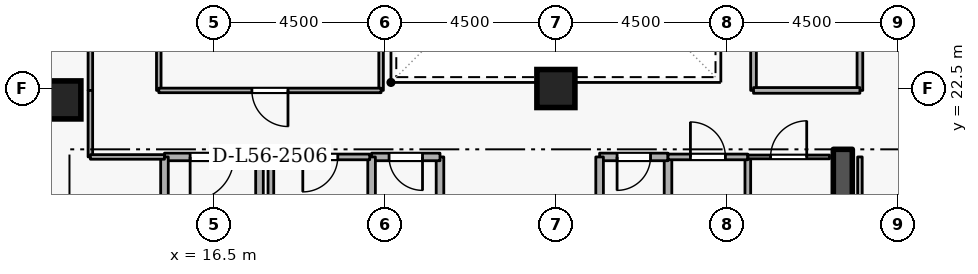
"""IFC4 building model, lengths in metres.
Left out: names, types, materials, properties, quantities, classifications, styles, units other than length and angle.
Written with IfcOpenShell. Run it as: python <this file> out.ifc"""

import sys

from ifc_helpers import new_model, si_unit, direction, frame, frame_2d, origin, origin_2d, place, context, subcontext, project, spatial, rectangle, extrude, element, fill, save


model = new_model("IFC4")
c1 = context("Model", 3, precision=1e-05, world=origin(), true_north=direction((0.0, 1.0)))
c2 = subcontext(c1, "Body", "Model", "MODEL_VIEW")
j1 = project(units=[si_unit("LENGTHUNIT", "METRE"), si_unit("PLANEANGLEUNIT", "RADIAN")], contexts=[c1])
p1 = place(None, origin())
s1 = spatial("IfcSite", under=j1, at=p1, CompositionType="ELEMENT")
p2 = place(p1, origin())
s2 = spatial("IfcBuilding", under=s1, at=p2, CompositionType="ELEMENT")
p3 = place(p2, frame((0.0, 0.0, 210.9)))
s3 = spatial("IfcBuildingStorey", under=s2, at=p3, CompositionType="ELEMENT", Elevation=210.9)
p4 = place(p3, frame((33.05, 15.1, 0.0), z_axis=(0.0, 0.0, 1.0), x_axis=(0.0, 1.0, 0.0)))
e1 = element("IfcWall", 1, at=p4, inside=s3, PredefinedType="SHEAR", context=c2, shape_type="SweptSolid", body=[
    extrude(rectangle(XDim=5.8, YDim=0.5, at=frame_2d((2.9, 0.0))), origin(), (0.0, 0.0, 1.0), 3.6),
])
for number, where, z_axis, x_axis in (
    (2, (12.5, 22.2, 0.0), (0.0, 0.0, 1.0), (1.0, 0.0, 0.0)),
    (3, (25.5, 22.5, 0.0), (0.0, 0.0, 1.0), (1.0, 0.0, 0.0)),
):
    element("IfcColumn", number, at=place(p3, frame(where, z_axis=z_axis, x_axis=x_axis)), inside=s3, PredefinedType="COLUMN", context=c2, shape_type="SweptSolid", body=[
        extrude(rectangle(XDim=1.0, YDim=1.0, at=origin_2d()), origin(), (0.0, 0.0, 1.0), 3.6),
    ])
p5 = place(p3, frame((17.7, 18.4, 0.0), z_axis=(0.0, 0.0, 1.0), x_axis=(0.0, 1.0, 0.0)))
e4 = element("IfcWall", 4, at=p5, inside=s3, PredefinedType="STANDARD", context=c2, shape_type="SweptSolid", body=[
    extrude(rectangle(XDim=2.3, YDim=0.2, at=frame_2d((1.15, 0.0))), origin(), (0.0, 0.0, 1.0), 2.545),
])
p6 = place(p3, frame((17.7, 20.7, 0.0), z_axis=(0.0, 0.0, 1.0), x_axis=(-1.0, 0.0, 0.0)))
e5 = element("IfcWall", 5, at=p6, inside=s3, PredefinedType="STANDARD", context=c2, shape_type="SweptSolid", body=[
    extrude(rectangle(XDim=2.5, YDim=0.2, at=frame_2d((1.25, 0.0))), origin(), (0.0, 0.0, 1.0), 3.34),
])
p7 = place(p6, frame((0.675, 0.0, 0.0)))
e6 = element("IfcOpeningElement", 6, at=p7, cuts=e5, PredefinedType="OPENING", context=c2, shape_type="SweptSolid", body=[
    extrude(rectangle(XDim=1.15, YDim=2.1, at=frame_2d((0.575, 1.05))), frame((0.0, 0.11, 0.0), z_axis=(0.0, -1.0, 0.0), x_axis=(1.0, 0.0, 0.0)), (0.0, 0.0, 1.0), 0.22),
])
p8 = place(p3, frame((15.2, 20.7, 0.0), z_axis=(0.0, 0.0, 1.0), x_axis=(0.0, -1.0, 0.0)))
e7 = element("IfcWall", 7, at=p8, inside=s3, PredefinedType="STANDARD", context=c2, shape_type="SweptSolid", body=[
    extrude(rectangle(XDim=5.7, YDim=0.2, at=frame_2d((2.85, 0.0))), origin(), (0.0, 0.0, 1.0), 3.34),
])
p9 = place(p3, frame((28.45, 18.65, 0.0), z_axis=(0.0, 0.0, 1.0), x_axis=(0.0, 1.0, 0.0)))
e8 = element("IfcWall", 8, at=p9, inside=s3, PredefinedType="STANDARD", context=c2, shape_type="SweptSolid", body=[
    extrude(rectangle(XDim=2.05, YDim=0.2, at=frame_2d((1.025, 0.0))), origin(), (0.0, 0.0, 1.0), 3.34),
])
p10 = place(p3, frame((28.45, 20.7, 0.0), z_axis=(0.0, 0.0, 1.0), x_axis=(-1.0, 0.0, 0.0)))
e9 = element("IfcWall", 9, at=p10, inside=s3, PredefinedType="STANDARD", context=c2, shape_type="SweptSolid", body=[
    extrude(rectangle(XDim=1.8, YDim=0.2, at=frame_2d((0.9, 0.0))), origin(), (0.0, 0.0, 1.0), 3.34),
])
p11 = place(p10, frame((0.46, 0.0, 0.0)))
e10 = element("IfcOpeningElement", 10, at=p11, cuts=e9, PredefinedType="OPENING", context=c2, shape_type="SweptSolid", body=[
    extrude(rectangle(XDim=0.88, YDim=2.04, at=frame_2d((0.44, 1.02))), frame((0.0, 0.11, 0.0), z_axis=(0.0, -1.0, 0.0), x_axis=(1.0, 0.0, 0.0)), (0.0, 0.0, 1.0), 0.22),
])
for number, where, z_axis, x_axis in (
    (11, (26.65, 20.7, 0.0), (0.0, 0.0, 1.0), (0.0, -1.0, 0.0)),
    (12, (22.45, 18.65, 0.0), (0.0, 0.0, 1.0), (0.0, 1.0, 0.0)),
):
    element("IfcWall", number, at=place(p3, frame(where, z_axis=z_axis, x_axis=x_axis)), inside=s3, PredefinedType="STANDARD", context=c2, shape_type="SweptSolid", body=[
        extrude(rectangle(XDim=2.05, YDim=0.2, at=frame_2d((1.025, 0.0))), origin(), (0.0, 0.0, 1.0), 3.34),
    ])
p12 = place(p3, frame((22.45, 20.7, 0.0), z_axis=(0.0, 0.0, 1.0), x_axis=(-1.0, 0.0, 0.0)))
e13 = element("IfcWall", 13, at=p12, inside=s3, PredefinedType="STANDARD", context=c2, shape_type="SweptSolid", body=[
    extrude(rectangle(XDim=1.8, YDim=0.2, at=frame_2d((0.9, 0.0))), origin(), (0.0, 0.0, 1.0), 3.34),
])
p13 = place(p12, frame((0.46, 0.0, 0.0)))
e14 = element("IfcOpeningElement", 14, at=p13, cuts=e13, PredefinedType="OPENING", context=c2, shape_type="SweptSolid", body=[
    extrude(rectangle(XDim=0.88, YDim=2.04, at=frame_2d((0.44, 1.02))), frame((0.0, 0.11, 0.0), z_axis=(0.0, -1.0, 0.0), x_axis=(1.0, 0.0, 0.0)), (0.0, 0.0, 1.0), 0.22),
])
p14 = place(p3, frame((20.65, 20.7, 0.0), z_axis=(0.0, 0.0, 1.0), x_axis=(0.0, -1.0, 0.0)))
e15 = element("IfcWall", 15, at=p14, inside=s3, PredefinedType="STANDARD", context=c2, shape_type="SweptSolid", body=[
    extrude(rectangle(XDim=2.05, YDim=0.2, at=frame_2d((1.025, 0.0))), origin(), (0.0, 0.0, 1.0), 3.34),
])
p15 = place(p3, frame((20.6, 20.7, 0.0), z_axis=(0.0, 0.0, 1.0), x_axis=(-1.0, 0.0, 0.0)))
e16 = element("IfcWall", 16, at=p15, inside=s3, PredefinedType="PARTITIONING", context=c2, shape_type="SweptSolid", body=[
    extrude(rectangle(XDim=2.6, YDim=0.15, at=frame_2d((1.3, 0.0))), origin(), (0.0, 0.0, 1.0), 3.34),
])
p16 = place(p15, frame((0.84, 0.0, 0.0)))
e17 = element("IfcOpeningElement", 17, at=p16, cuts=e16, PredefinedType="OPENING", context=c2, shape_type="SweptSolid", body=[
    extrude(rectangle(XDim=0.92, YDim=2.08, at=frame_2d((0.46, 1.04))), frame((0.0, 0.085, 0.0), z_axis=(0.0, -1.0, 0.0), x_axis=(1.0, 0.0, 0.0)), (0.0, 0.0, 1.0), 0.17),
])
p17 = place(p3, frame((18.0, 20.7, 0.0), z_axis=(0.0, 0.0, 1.0), x_axis=(0.0, -1.0, 0.0)))
e18 = element("IfcWall", 18, at=p17, inside=s3, PredefinedType="PARTITIONING", context=c2, shape_type="SweptSolid", body=[
    extrude(rectangle(XDim=2.05, YDim=0.15, at=frame_2d((1.025, 0.0))), origin(), (0.0, 0.0, 1.0), 2.545),
])
p18 = place(p3, frame((30.55, 20.7, 0.0), z_axis=(0.0, 0.0, 1.0), x_axis=(0.0, -1.0, 0.0)))
e19 = element("IfcWall", 19, at=p18, inside=s3, PredefinedType="PARTITIONING", context=c2, shape_type="SweptSolid", body=[
    extrude(rectangle(XDim=2.05, YDim=0.15, at=frame_2d((1.025, 0.0))), origin(), (0.0, 0.0, 1.0), 3.34),
])
p19 = place(p3, frame((28.45, 20.7, 0.0), z_axis=(0.0, 0.0, 1.0), x_axis=(1.0, 0.0, 0.0)))
e20 = element("IfcWall", 20, at=p19, inside=s3, PredefinedType="PARTITIONING", context=c2, shape_type="SweptSolid", body=[
    extrude(rectangle(XDim=2.1, YDim=0.15, at=frame_2d((1.05, 0.0))), origin(), (0.0, 0.0, 1.0), 3.34),
])
p20 = place(p19, frame((0.59, 0.0, 0.0)))
e21 = element("IfcOpeningElement", 21, at=p20, cuts=e20, PredefinedType="OPENING", context=c2, shape_type="SweptSolid", body=[
    extrude(rectangle(XDim=0.92, YDim=2.08, at=frame_2d((0.46, 1.04))), frame((0.0, 0.085, 0.0), z_axis=(0.0, -1.0, 0.0), x_axis=(1.0, 0.0, 0.0)), (0.0, 0.0, 1.0), 0.17),
])
p21 = place(p3, frame((30.55, 20.7, 0.0), z_axis=(0.0, 0.0, 1.0), x_axis=(1.0, 0.0, 0.0)))
e22 = element("IfcWall", 22, at=p21, inside=s3, PredefinedType="PARTITIONING", context=c2, shape_type="SweptSolid", body=[
    extrude(rectangle(XDim=2.15, YDim=0.1, at=frame_2d((1.075, 0.0))), origin(), (0.0, 0.0, 1.0), 3.34),
])
p22 = place(p21, frame((0.6, 0.0, 0.0)))
e23 = element("IfcOpeningElement", 23, at=p22, cuts=e22, PredefinedType="OPENING", context=c2, shape_type="SweptSolid", body=[
    extrude(rectangle(XDim=0.95, YDim=2.1, at=frame_2d((0.475, 1.05))), frame((0.0, 0.06, 0.0), z_axis=(0.0, -1.0, 0.0), x_axis=(1.0, 0.0, 0.0)), (0.0, 0.0, 1.0), 0.12),
])
p23 = place(p3, frame((33.5, 20.7, 0.0), z_axis=(0.0, 0.0, 1.0), x_axis=(0.0, -1.0, 0.0)))
e24 = element("IfcWall", 24, at=p23, inside=s3, PredefinedType="PARTITIONING", context=c2, shape_type="SweptSolid", body=[
    extrude(rectangle(XDim=5.9, YDim=0.12, at=frame_2d((2.95, 0.0))), origin(), (0.0, 0.0, 1.0), 3.34),
])
p24 = place(p3, frame((13.25, 28.2, 0.0), z_axis=(0.0, 0.0, 1.0), x_axis=(0.0, -1.0, 0.0)))
e25 = element("IfcWall", 25, at=p24, inside=s3, PredefinedType="PARTITIONING", context=c2, shape_type="SweptSolid", body=[
    extrude(rectangle(XDim=5.75, YDim=0.12, at=frame_2d((2.875, 0.0))), origin(), (0.0, 0.0, 1.0), 3.34),
])
p25 = place(p24, frame((2.35, 0.0, 0.0)))
e26 = element("IfcOpeningElement", 26, at=p25, cuts=e25, PredefinedType="OPENING", context=c2, shape_type="SweptSolid", body=[
    extrude(rectangle(XDim=1.05, YDim=2.1, at=frame_2d((0.525, 1.05))), frame((0.0, 0.07, 0.0), z_axis=(0.0, -1.0, 0.0), x_axis=(1.0, 0.0, 0.0)), (0.0, 0.0, 1.0), 0.14),
])
p26 = place(p3, frame((13.25, 22.45, 0.0), z_axis=(0.0, 0.0, 1.0), x_axis=(0.0, -1.0, 0.0)))
e27 = element("IfcWall", 27, at=p26, inside=s3, PredefinedType="PARTITIONING", context=c2, shape_type="SweptSolid", body=[
    extrude(rectangle(XDim=1.75, YDim=0.12, at=frame_2d((0.875, 0.0))), origin(), (0.0, 0.0, 1.0), 3.34),
])
p27 = place(p3, frame((13.25, 20.7, 0.0), z_axis=(0.0, 0.0, 1.0), x_axis=(1.0, 0.0, 0.0)))
e28 = element("IfcWall", 28, at=p27, inside=s3, PredefinedType="PARTITIONING", context=c2, shape_type="SweptSolid", body=[
    extrude(rectangle(XDim=1.95, YDim=0.12, at=frame_2d((0.975, 0.0))), origin(), (0.0, 0.0, 1.0), 3.34),
])
for number, where, z_axis, x_axis in (
    (29, (15.05, 22.45, 0.0), (0.0, 0.0, 1.0), (0.0, 1.0, 0.0)),
    (30, (20.9, 28.2, 0.0), (0.0, 0.0, 1.0), (0.0, -1.0, 0.0)),
):
    element("IfcWall", number, at=place(p3, frame(where, z_axis=z_axis, x_axis=x_axis)), inside=s3, PredefinedType="PARTITIONING", context=c2, shape_type="SweptSolid", body=[
        extrude(rectangle(XDim=5.75, YDim=0.12, at=frame_2d((2.875, 0.0))), origin(), (0.0, 0.0, 1.0), 3.34),
    ])
p28 = place(p3, frame((20.9, 22.45, 0.0), z_axis=(0.0, 0.0, 1.0), x_axis=(-1.0, 0.0, 0.0)))
e31 = element("IfcWall", 31, at=p28, inside=s3, PredefinedType="PARTITIONING", context=c2, shape_type="SweptSolid", body=[
    extrude(rectangle(XDim=5.85, YDim=0.12, at=frame_2d((2.925, 0.0))), origin(), (0.0, 0.0, 1.0), 3.34),
])
p29 = place(p28, frame((2.45, 0.0, 0.0)))
e32 = element("IfcOpeningElement", 32, at=p29, cuts=e31, PredefinedType="OPENING", context=c2, shape_type="SweptSolid", body=[
    extrude(rectangle(XDim=0.95, YDim=2.1, at=frame_2d((0.475, 1.05))), frame((0.0, 0.07, 0.0), z_axis=(0.0, -1.0, 0.0), x_axis=(1.0, 0.0, 0.0)), (0.0, 0.0, 1.0), 0.14),
])
p30 = place(p3, frame((30.7, 22.45, 0.0), z_axis=(0.0, 0.0, 1.0), x_axis=(0.0, 1.0, 0.0)))
e33 = element("IfcWall", 33, at=p30, inside=s3, PredefinedType="PARTITIONING", context=c2, shape_type="SweptSolid", body=[
    extrude(rectangle(XDim=4.55, YDim=0.15, at=frame_2d((2.275, 0.0))), origin(), (0.0, 0.0, 1.0), 3.34),
])
p31 = place(p3, frame((33.5, 27.0, 0.0), z_axis=(0.0, 0.0, 1.0), x_axis=(0.0, -1.0, 0.0)))
e34 = element("IfcWall", 34, at=p31, inside=s3, PredefinedType="PARTITIONING", context=c2, shape_type="SweptSolid", body=[
    extrude(rectangle(XDim=4.55, YDim=0.15, at=frame_2d((2.275, 0.0))), origin(), (0.0, 0.0, 1.0), 3.34),
])
p32 = place(p31, frame((1.625, 0.0, 0.0)))
e35 = element("IfcOpeningElement", 35, at=p32, cuts=e34, PredefinedType="OPENING", context=c2, shape_type="SweptSolid", body=[
    extrude(rectangle(XDim=1.3, YDim=2.12, at=frame_2d((0.65, 1.06))), frame((0.0, 0.085, 0.0), z_axis=(0.0, -1.0, 0.0), x_axis=(1.0, 0.0, 0.0)), (0.0, 0.0, 1.0), 0.17),
])
p33 = place(p3, frame((33.5, 22.45, 0.0), z_axis=(0.0, 0.0, 1.0), x_axis=(-1.0, 0.0, 0.0)))
e36 = element("IfcWall", 36, at=p33, inside=s3, PredefinedType="PARTITIONING", context=c2, shape_type="SweptSolid", body=[
    extrude(rectangle(XDim=2.8, YDim=0.15, at=frame_2d((1.4, 0.0))), origin(), (0.0, 0.0, 1.0), 3.34),
])
p34 = place(p7, origin())
e37 = element("IfcDoor", 37, at=p34, inside=s3, OperationType="SINGLE_SWING_RIGHT", PredefinedType="DOOR", context=c2, shape_type="SweptSolid", body=[
    extrude(rectangle(XDim=1.15, YDim=2.1, at=frame_2d((0.575, 1.05))), frame((0.0, 0.025, 0.0), z_axis=(0.0, -1.0, 0.0), x_axis=(1.0, 0.0, 0.0)), (0.0, 0.0, 1.0), 0.05),
])
fill(e6, e37)
p35 = place(p11, origin())
e38 = element("IfcDoor", 38, at=p35, inside=s3, OperationType="SINGLE_SWING_RIGHT", PredefinedType="DOOR", context=c2, shape_type="SweptSolid", body=[
    extrude(rectangle(XDim=0.88, YDim=2.04, at=frame_2d((0.44, 1.02))), frame((0.0, 0.025, 0.0), z_axis=(0.0, -1.0, 0.0), x_axis=(1.0, 0.0, 0.0)), (0.0, 0.0, 1.0), 0.05),
])
fill(e10, e38)
p36 = place(p13, origin())
e39 = element("IfcDoor", 39, at=p36, inside=s3, OperationType="SINGLE_SWING_LEFT", PredefinedType="DOOR", context=c2, shape_type="SweptSolid", body=[
    extrude(rectangle(XDim=0.88, YDim=2.04, at=frame_2d((0.44, 1.02))), frame((0.0, 0.025, 0.0), z_axis=(0.0, -1.0, 0.0), x_axis=(1.0, 0.0, 0.0)), (0.0, 0.0, 1.0), 0.05),
])
fill(e14, e39)
p37 = place(p16, origin())
e40 = element("IfcDoor", 40, at=p37, inside=s3, OperationType="SINGLE_SWING_RIGHT", PredefinedType="DOOR", context=c2, shape_type="SweptSolid", body=[
    extrude(rectangle(XDim=0.92, YDim=2.08, at=frame_2d((0.46, 1.04))), frame((0.0, 0.025, 0.0), z_axis=(0.0, -1.0, 0.0), x_axis=(1.0, 0.0, 0.0)), (0.0, 0.0, 1.0), 0.05),
])
fill(e17, e40)
p38 = place(p20, origin())
e41 = element("IfcDoor", 41, at=p38, inside=s3, OperationType="SINGLE_SWING_LEFT", PredefinedType="DOOR", context=c2, shape_type="SweptSolid", body=[
    extrude(rectangle(XDim=0.92, YDim=2.08, at=frame_2d((0.46, 1.04))), frame((0.0, 0.025, 0.0), z_axis=(0.0, -1.0, 0.0), x_axis=(1.0, 0.0, 0.0)), (0.0, 0.0, 1.0), 0.05),
])
fill(e21, e41)
p39 = place(p22, origin())
e42 = element("IfcDoor", 42, at=p39, inside=s3, OperationType="SINGLE_SWING_RIGHT", PredefinedType="DOOR", context=c2, shape_type="SweptSolid", body=[
    extrude(rectangle(XDim=0.95, YDim=2.1, at=frame_2d((0.475, 1.05))), frame((0.0, 0.025, 0.0), z_axis=(0.0, -1.0, 0.0), x_axis=(1.0, 0.0, 0.0)), (0.0, 0.0, 1.0), 0.05),
])
fill(e23, e42)
p40 = place(p29, origin())
e43 = element("IfcDoor", 43, at=p40, inside=s3, OperationType="SINGLE_SWING_LEFT", PredefinedType="DOOR", context=c2, shape_type="SweptSolid", body=[
    extrude(rectangle(XDim=0.95, YDim=2.1, at=frame_2d((0.475, 1.05))), frame((0.0, 0.025, 0.0), z_axis=(0.0, -1.0, 0.0), x_axis=(1.0, 0.0, 0.0)), (0.0, 0.0, 1.0), 0.05),
])
fill(e32, e43)
save(model, sys.argv[1])
